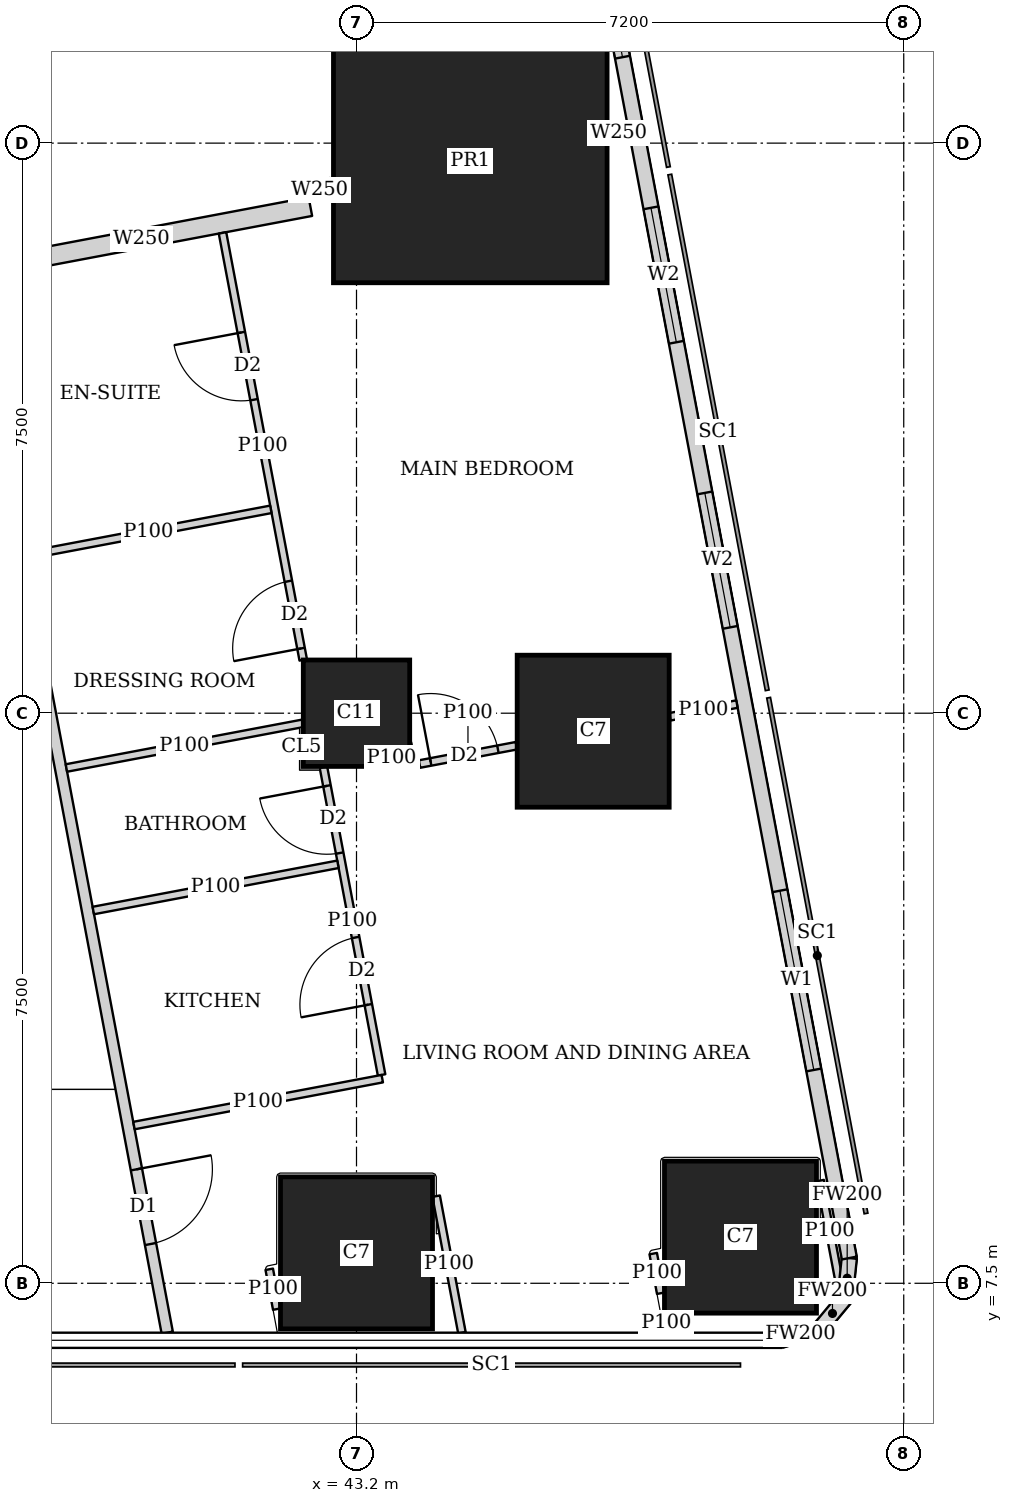
"""IFC4 building model, lengths in metres.
Left out: names, types, materials, properties, quantities, classifications, styles, units other than length and angle.
Written with IfcOpenShell. Run it as: python <this file> out.ifc"""

import sys

from ifc_helpers import new_model, si_unit, direction, frame, frame_2d, origin, origin_2d, place, context, subcontext, project, spatial, rectangle, extrude, element, fill, save


model = new_model("IFC4")
c1 = context("Model", 3, precision=1e-05, world=origin(), true_north=direction((0.0, 1.0)))
c2 = subcontext(c1, "Body", "Model", "MODEL_VIEW")
j1 = project(units=[si_unit("LENGTHUNIT", "METRE"), si_unit("PLANEANGLEUNIT", "RADIAN")], contexts=[c1])
p1 = place(None, origin())
s1 = spatial("IfcSite", under=j1, at=p1, CompositionType="ELEMENT")
p2 = place(p1, origin())
s2 = spatial("IfcBuilding", under=s1, at=p2, CompositionType="ELEMENT")
p3 = place(p2, frame((0.0, 0.0, 292.85)))
s3 = spatial("IfcBuildingStorey", under=s2, at=p3, CompositionType="ELEMENT", Elevation=292.85)
for number, where, z_axis, x_axis in (
    (1, (43.2, 7.9, 0.0), (0.0, 0.0, 1.0), (1.0, 0.0, 0.0)),
    (2, (48.252, 8.107, 0.0), (0.0, 0.0, 1.0), (1.0, 0.0, 0.0)),
):
    element("IfcColumn", number, at=place(p3, frame(where, z_axis=z_axis, x_axis=x_axis)), inside=s3, PredefinedType="COLUMN", context=c2, shape_type="SweptSolid", body=[
        extrude(rectangle(XDim=2.0, YDim=2.0, at=origin_2d()), origin(), (0.0, 0.0, 1.0), 3.75),
    ])
p4 = place(p3, frame((43.2, 15.0, 0.0), z_axis=(0.0, 0.0, 1.0), x_axis=(1.0, 0.0, 0.0)))
e3 = element("IfcColumn", 3, at=p4, inside=s3, PredefinedType="COLUMN", context=c2, shape_type="SweptSolid", body=[
    extrude(rectangle(XDim=1.4, YDim=1.4, at=origin_2d()), origin(), (0.0, 0.0, 1.0), 3.75),
])
p5 = place(p3, frame((46.314, 14.763, 0.0), z_axis=(0.0, 0.0, 1.0), x_axis=(1.0, 0.0, 0.0)))
e4 = element("IfcColumn", 4, at=p5, inside=s3, PredefinedType="COLUMN", context=c2, shape_type="SweptSolid", body=[
    extrude(rectangle(XDim=2.0, YDim=2.0, at=origin_2d()), origin(), (0.0, 0.0, 1.0), 3.75),
])
p6 = place(p3, frame((44.697, 22.263, 0.0), z_axis=(0.0, 0.0, 1.0), x_axis=(1.0, 0.0, 0.0)))
e5 = element("IfcColumn", 5, at=p6, inside=s3, PredefinedType="COLUMN", context=c2, shape_type="SweptSolid", body=[
    extrude(rectangle(XDim=3.6, YDim=3.2, at=origin_2d()), origin(), (0.0, 0.0, 1.0), 3.75),
])
p7 = place(p3, frame((48.787, 6.75, 0.0), z_axis=(0.0, 0.0, 1.0), x_axis=(0.957282247819, 0.289155145225, 0.0)))
e6 = element("IfcWall", 6, at=p7, inside=s3, PredefinedType="SOLIDWALL", context=c2, shape_type="SweptSolid", body=[
    extrude(rectangle(XDim=0.533, YDim=0.2, at=frame_2d((0.266, 0.0))), origin(), (0.0, 0.0, 1.0), 3.4),
])
p8 = place(p3, frame((49.297, 6.904, 0.0), z_axis=(0.0, 0.0, 1.0), x_axis=(0.639255849474, 0.768994121508, 0.0)))
e7 = element("IfcWall", 7, at=p8, inside=s3, PredefinedType="SOLIDWALL", context=c2, shape_type="SweptSolid", body=[
    extrude(rectangle(XDim=0.518, YDim=0.2, at=frame_2d((0.259, 0.0))), origin(), (0.0, 0.0, 1.0), 3.4),
])
p9 = place(p3, frame((49.628, 7.302, 0.0), z_axis=(0.0, 0.0, 1.0), x_axis=(0.105352390132, 0.994434952068, 0.0)))
e8 = element("IfcWall", 8, at=p9, inside=s3, PredefinedType="SOLIDWALL", context=c2, shape_type="SweptSolid", body=[
    extrude(rectangle(XDim=0.533, YDim=0.2, at=frame_2d((0.267, 0.0))), origin(), (0.0, 0.0, 1.0), 3.4),
])
p10 = place(p3, frame((49.684, 7.832, 0.0), z_axis=(0.0, 0.0, 1.0), x_axis=(-0.185616669694, 0.982622232565, 0.0)))
e9 = element("IfcWall", 9, at=p10, inside=s3, PredefinedType="SOLIDWALL", context=c2, shape_type="SweptSolid", body=[
    extrude(rectangle(XDim=36.0, YDim=0.2, at=frame_2d((18.0, 0.0))), origin(), (0.0, 0.0, 1.0), 3.4),
])
p11 = place(p10, frame((2.518, 0.0, 0.9)))
e10 = element("IfcOpeningElement", 10, at=p11, cuts=e9, PredefinedType="OPENING", context=c2, shape_type="SweptSolid", body=[
    extrude(rectangle(XDim=2.4, YDim=1.5, at=frame_2d((1.2, 0.75))), frame((0.0, 0.11, 0.0), z_axis=(0.0, -1.0, 0.0), x_axis=(1.0, 0.0, 0.0)), (0.0, 0.0, 1.0), 0.22),
])
p12 = place(p10, frame((8.444, 0.0, 0.9)))
e11 = element("IfcOpeningElement", 11, at=p12, cuts=e9, PredefinedType="OPENING", context=c2, shape_type="SweptSolid", body=[
    extrude(rectangle(XDim=1.8, YDim=1.5, at=frame_2d((0.9, 0.75))), frame((0.0, 0.11, 0.0), z_axis=(0.0, -1.0, 0.0), x_axis=(1.0, 0.0, 0.0)), (0.0, 0.0, 1.0), 0.22),
])
p13 = place(p10, frame((12.261, 0.0, 0.9)))
e12 = element("IfcOpeningElement", 12, at=p13, cuts=e9, PredefinedType="OPENING", context=c2, shape_type="SweptSolid", body=[
    extrude(rectangle(XDim=1.8, YDim=1.5, at=frame_2d((0.9, 0.75))), frame((0.0, 0.11, 0.0), z_axis=(0.0, -1.0, 0.0), x_axis=(1.0, 0.0, 0.0)), (0.0, 0.0, 1.0), 0.22),
])
p14 = place(p10, frame((16.078, 0.0, 0.9)))
e13 = element("IfcOpeningElement", 13, at=p14, cuts=e9, PredefinedType="OPENING", context=c2, shape_type="SweptSolid", body=[
    extrude(rectangle(XDim=1.8, YDim=1.5, at=frame_2d((0.9, 0.75))), frame((0.0, 0.11, 0.0), z_axis=(0.0, -1.0, 0.0), x_axis=(1.0, 0.0, 0.0)), (0.0, 0.0, 1.0), 0.22),
])
p15 = place(p10, frame((19.894, 0.0, 0.9)))
e14 = element("IfcOpeningElement", 14, at=p15, cuts=e9, PredefinedType="OPENING", context=c2, shape_type="SweptSolid", body=[
    extrude(rectangle(XDim=1.8, YDim=1.5, at=frame_2d((0.9, 0.75))), frame((0.0, 0.11, 0.0), z_axis=(0.0, -1.0, 0.0), x_axis=(1.0, 0.0, 0.0)), (0.0, 0.0, 1.0), 0.22),
])
p16 = place(p10, frame((23.71, 0.0, 0.9)))
e15 = element("IfcOpeningElement", 15, at=p16, cuts=e9, PredefinedType="OPENING", context=c2, shape_type="SweptSolid", body=[
    extrude(rectangle(XDim=1.8, YDim=1.5, at=frame_2d((0.9, 0.75))), frame((0.0, 0.11, 0.0), z_axis=(0.0, -1.0, 0.0), x_axis=(1.0, 0.0, 0.0)), (0.0, 0.0, 1.0), 0.22),
])
p17 = place(p10, frame((27.526, 0.0, 0.9)))
e16 = element("IfcOpeningElement", 16, at=p17, cuts=e9, PredefinedType="OPENING", context=c2, shape_type="SweptSolid", body=[
    extrude(rectangle(XDim=1.8, YDim=1.5, at=frame_2d((0.9, 0.75))), frame((0.0, 0.11, 0.0), z_axis=(0.0, -1.0, 0.0), x_axis=(1.0, 0.0, 0.0)), (0.0, 0.0, 1.0), 0.22),
])
p18 = place(p10, frame((32.046, 0.0, 0.9)))
e17 = element("IfcOpeningElement", 17, at=p18, cuts=e9, PredefinedType="OPENING", context=c2, shape_type="SweptSolid", body=[
    extrude(rectangle(XDim=1.8, YDim=1.5, at=frame_2d((0.9, 0.75))), frame((0.0, 0.11, 0.0), z_axis=(0.0, -1.0, 0.0), x_axis=(1.0, 0.0, 0.0)), (0.0, 0.0, 1.0), 0.22),
])
p19 = place(p3, frame((34.036, 42.186, 0.0), z_axis=(0.0, 0.0, 1.0), x_axis=(0.185593518645, -0.9826266055, 0.0)))
e18 = element("IfcWall", 18, at=p19, inside=s3, PredefinedType="SOLIDWALL", context=c2, shape_type="SweptSolid", body=[
    extrude(rectangle(XDim=35.961, YDim=0.15, at=frame_2d((17.98, 0.0))), origin(), (0.0, 0.0, 1.0), 2.4),
])
p20 = place(p19, frame((19.345, 0.0, 0.0)))
e19 = element("IfcOpeningElement", 19, at=p20, cuts=e18, PredefinedType="OPENING", context=c2, shape_type="SweptSolid", body=[
    extrude(rectangle(XDim=1.0, YDim=2.1, at=frame_2d((0.5, 1.05))), frame((0.0, 0.085, 0.0), z_axis=(0.0, -1.0, 0.0), x_axis=(1.0, 0.0, 0.0)), (0.0, 0.0, 1.0), 0.17),
])
p21 = place(p19, frame((33.774, 0.0, 0.0)))
e20 = element("IfcOpeningElement", 20, at=p21, cuts=e18, PredefinedType="OPENING", context=c2, shape_type="SweptSolid", body=[
    extrude(rectangle(XDim=1.0, YDim=2.1, at=frame_2d((0.5, 1.05))), frame((0.0, 0.085, 0.0), z_axis=(0.0, -1.0, 0.0), x_axis=(1.0, 0.0, 0.0)), (0.0, 0.0, 1.0), 0.17),
])
p22 = place(p3, frame((44.248, 8.646, 0.0), z_axis=(0.0, 0.0, 1.0), x_axis=(0.185417594585, -0.982659816833, 0.0)))
e21 = element("IfcWall", 21, at=p22, inside=s3, PredefinedType="PARTITIONING", context=c2, shape_type="SweptSolid", body=[
    extrude(rectangle(XDim=1.828, YDim=0.1, at=frame_2d((0.914, 0.0))), origin(), (0.0, 0.0, 1.0), 1.95),
])
p23 = place(p3, frame((42.151, 7.16, 0.0), z_axis=(0.0, 0.0, 1.0), x_axis=(-0.185366164644, 0.982669519729, 0.0)))
e22 = element("IfcWall", 22, at=p23, inside=s3, PredefinedType="PARTITIONING", context=c2, shape_type="SweptSolid", body=[
    extrude(rectangle(XDim=0.533, YDim=0.1, at=frame_2d((0.267, 0.0))), origin(), (0.0, 0.0, 1.0), 2.4),
])
p24 = place(p3, frame((49.3, 8.851, 0.0), z_axis=(0.0, 0.0, 1.0), x_axis=(0.18581620423, -0.982584519645, 0.0)))
e23 = element("IfcWall", 23, at=p24, inside=s3, PredefinedType="PARTITIONING", context=c2, shape_type="SweptSolid", body=[
    extrude(rectangle(XDim=1.351, YDim=0.1, at=frame_2d((0.675, 0.0))), origin(), (0.0, 0.0, 1.0), 3.4),
])
p25 = place(p3, frame((47.301, 6.85, 0.0), z_axis=(0.0, 0.0, 1.0), x_axis=(-0.187513903188, 0.982261948826, 0.0)))
e24 = element("IfcWall", 24, at=p25, inside=s3, PredefinedType="PARTITIONING", context=c2, shape_type="SweptSolid", body=[
    extrude(rectangle(XDim=0.251, YDim=0.1, at=frame_2d((0.125, 0.0))), origin(), (0.0, 0.0, 1.0), 3.4),
])
p26 = place(p3, frame((47.203, 7.369, 0.0), z_axis=(0.0, 0.0, 1.0), x_axis=(-0.186456243114, 0.982463266185, 0.0)))
e25 = element("IfcWall", 25, at=p26, inside=s3, PredefinedType="PARTITIONING", context=c2, shape_type="SweptSolid", body=[
    extrude(rectangle(XDim=0.53, YDim=0.1, at=frame_2d((0.265, 0.0))), origin(), (0.0, 0.0, 1.0), 1.95),
])
p27 = place(p3, frame((46.782, 22.657, 0.0), z_axis=(0.0, 0.0, 1.0), x_axis=(-0.982104607121, -0.188336243648, 0.0)))
e26 = element("IfcWall", 26, at=p27, inside=s3, PredefinedType="SOLIDWALL", context=c2, shape_type="SweptSolid", body=[
    extrude(rectangle(XDim=0.266, YDim=0.25, at=frame_2d((0.133, 0.0))), origin(), (0.0, 0.0, 1.0), 3.4),
])
p28 = place(p3, frame((42.873, 21.918, 0.0), z_axis=(0.0, 0.0, 1.0), x_axis=(-0.982431406936, -0.186624035603, 0.0)))
e27 = element("IfcWall", 27, at=p28, inside=s3, PredefinedType="SOLIDWALL", context=c2, shape_type="SweptSolid", body=[
    extrude(rectangle(XDim=0.322, YDim=0.25, at=frame_2d((0.161, 0.0))), origin(), (0.0, 0.0, 1.0), 2.4),
])
p29 = place(p3, frame((42.593, 21.665, 0.0), z_axis=(0.0, 0.0, 1.0), x_axis=(-0.982612837616, -0.185666398014, 0.0)))
e28 = element("IfcWall", 28, at=p29, inside=s3, PredefinedType="SOLIDWALL", context=c2, shape_type="SweptSolid", body=[
    extrude(rectangle(XDim=4.525, YDim=0.25, at=frame_2d((2.262, 0.0))), origin(), (0.0, 0.0, 1.0), 2.4),
])
p30 = place(p3, frame((48.206, 15.12, 0.0), z_axis=(0.0, 0.0, 1.0), x_axis=(-0.982497680814, -0.186274816318, 0.0)))
e29 = element("IfcWall", 29, at=p30, inside=s3, PredefinedType="PARTITIONING", context=c2, shape_type="SweptSolid", body=[
    extrude(rectangle(XDim=0.898, YDim=0.1, at=frame_2d((0.449, 0.0))), origin(), (0.0, 0.0, 1.0), 3.4),
])
p31 = place(p3, frame((45.304, 14.572, 0.0), z_axis=(0.0, 0.0, 1.0), x_axis=(-0.982602741717, -0.185719821156, 0.0)))
e30 = element("IfcWall", 30, at=p31, inside=s3, PredefinedType="PARTITIONING", context=c2, shape_type="SweptSolid", body=[
    extrude(rectangle(XDim=1.297, YDim=0.1, at=frame_2d((0.649, 0.0))), origin(), (0.0, 0.0, 1.0), 3.4),
])
p32 = place(p31, frame((0.248, 0.0, 0.0)))
e31 = element("IfcOpeningElement", 31, at=p32, cuts=e30, PredefinedType="OPENING", context=c2, shape_type="SweptSolid", body=[
    extrude(rectangle(XDim=0.9, YDim=2.1, at=frame_2d((0.45, 1.05))), frame((0.0, 0.06, 0.0), z_axis=(0.0, -1.0, 0.0), x_axis=(1.0, 0.0, 0.0)), (0.0, 0.0, 1.0), 0.12),
])
p33 = place(p3, frame((43.949, 14.485, 0.0), z_axis=(0.0, 0.0, 1.0), x_axis=(0.188651210932, -0.982044154106, 0.0)))
e32 = element("IfcWall", 32, at=p33, inside=s3, PredefinedType="PARTITIONING", context=c2, shape_type="SweptSolid", body=[
    extrude(rectangle(XDim=0.138, YDim=0.1, at=frame_2d((0.069, 0.0))), origin(), (0.0, 0.0, 1.0), 3.4),
])
p34 = place(p3, frame((42.073, 17.682, 0.0), z_axis=(0.0, 0.0, 1.0), x_axis=(-0.982620626894, -0.185625169636, 0.0)))
e33 = element("IfcWall", 33, at=p34, inside=s3, PredefinedType="PARTITIONING", context=c2, shape_type="SweptSolid", body=[
    extrude(rectangle(XDim=3.275, YDim=0.1, at=frame_2d((1.637, 0.0))), origin(), (0.0, 0.0, 1.0), 2.5),
])
p35 = place(p3, frame((42.49, 14.866, 0.0), z_axis=(0.0, 0.0, 1.0), x_axis=(-0.982621285075, -0.185621685472, 0.0)))
e34 = element("IfcWall", 34, at=p35, inside=s3, PredefinedType="PARTITIONING", context=c2, shape_type="SweptSolid", body=[
    extrude(rectangle(XDim=3.162, YDim=0.1, at=frame_2d((1.581, 0.0))), origin(), (0.0, 0.0, 1.0), 2.5),
])
p36 = place(p3, frame((42.956, 13.012, 0.0), z_axis=(0.0, 0.0, 1.0), x_axis=(-0.982630897129, -0.185570795135, 0.0)))
e35 = element("IfcWall", 35, at=p36, inside=s3, PredefinedType="PARTITIONING", context=c2, shape_type="SweptSolid", body=[
    extrude(rectangle(XDim=3.276, YDim=0.1, at=frame_2d((1.638, 0.0))), origin(), (0.0, 0.0, 1.0), 2.5),
])
p37 = place(p3, frame((43.539, 10.192, 0.0), z_axis=(0.0, 0.0, 1.0), x_axis=(-0.982633623707, -0.185556356831, 0.0)))
e36 = element("IfcWall", 36, at=p37, inside=s3, PredefinedType="PARTITIONING", context=c2, shape_type="SweptSolid", body=[
    extrude(rectangle(XDim=3.325, YDim=0.1, at=frame_2d((1.663, 0.0))), origin(), (0.0, 0.0, 1.0), 2.5),
])
p38 = place(p3, frame((41.437, 21.319, 0.0), z_axis=(0.0, 0.0, 1.0), x_axis=(0.185742368638, -0.982598479794, 0.0)))
e37 = element("IfcWall", 37, at=p38, inside=s3, PredefinedType="PARTITIONING", context=c2, shape_type="SweptSolid", body=[
    extrude(rectangle(XDim=5.718, YDim=0.1, at=frame_2d((2.859, 0.0))), origin(), (0.0, 0.0, 1.0), 3.4),
])
p39 = place(p38, frame((1.333, 0.0, 0.0)))
e38 = element("IfcOpeningElement", 38, at=p39, cuts=e37, PredefinedType="OPENING", context=c2, shape_type="SweptSolid", body=[
    extrude(rectangle(XDim=0.9, YDim=2.1, at=frame_2d((0.45, 1.05))), frame((0.0, 0.06, 0.0), z_axis=(0.0, -1.0, 0.0), x_axis=(1.0, 0.0, 0.0)), (0.0, 0.0, 1.0), 0.12),
])
p40 = place(p38, frame((4.664, 0.0, 0.0)))
e39 = element("IfcOpeningElement", 39, at=p40, cuts=e37, PredefinedType="OPENING", context=c2, shape_type="SweptSolid", body=[
    extrude(rectangle(XDim=0.9, YDim=2.1, at=frame_2d((0.45, 1.05))), frame((0.0, 0.06, 0.0), z_axis=(0.0, -1.0, 0.0), x_axis=(1.0, 0.0, 0.0)), (0.0, 0.0, 1.0), 0.12),
])
p41 = place(p3, frame((42.765, 14.29, 0.0), z_axis=(0.0, 0.0, 1.0), x_axis=(0.185679870644, -0.982610291844, 0.0)))
e40 = element("IfcWall", 40, at=p41, inside=s3, PredefinedType="PARTITIONING", context=c2, shape_type="SweptSolid", body=[
    extrude(rectangle(XDim=4.121, YDim=0.1, at=frame_2d((2.061, 0.0))), origin(), (0.0, 0.0, 1.0), 2.5),
])
p42 = place(p41, frame((0.25, 0.0, 0.0)))
e41 = element("IfcOpeningElement", 41, at=p42, cuts=e40, PredefinedType="OPENING", context=c2, shape_type="SweptSolid", body=[
    extrude(rectangle(XDim=0.9, YDim=2.1, at=frame_2d((0.45, 1.05))), frame((0.0, 0.06, 0.0), z_axis=(0.0, -1.0, 0.0), x_axis=(1.0, 0.0, 0.0)), (0.0, 0.0, 1.0), 0.12),
])
p43 = place(p41, frame((2.28, 0.0, 0.0)))
e42 = element("IfcOpeningElement", 42, at=p43, cuts=e40, PredefinedType="OPENING", context=c2, shape_type="SweptSolid", body=[
    extrude(rectangle(XDim=0.9, YDim=2.1, at=frame_2d((0.45, 1.05))), frame((0.0, 0.06, 0.0), z_axis=(0.0, -1.0, 0.0), x_axis=(1.0, 0.0, 0.0)), (0.0, 0.0, 1.0), 0.12),
])
p44 = place(p11, origin())
e43 = element("IfcWindow", 43, at=p44, inside=s3, PartitioningType="SINGLE_PANEL", PredefinedType="WINDOW", context=c2, shape_type="SweptSolid", body=[
    extrude(rectangle(XDim=2.4, YDim=1.5, at=frame_2d((1.2, 0.75))), frame((0.0, 0.03, 0.0), z_axis=(0.0, -1.0, 0.0), x_axis=(1.0, 0.0, 0.0)), (0.0, 0.0, 1.0), 0.06),
])
fill(e10, e43)
p45 = place(p12, origin())
e44 = element("IfcWindow", 44, at=p45, inside=s3, PartitioningType="SINGLE_PANEL", PredefinedType="WINDOW", context=c2, shape_type="SweptSolid", body=[
    extrude(rectangle(XDim=1.8, YDim=1.5, at=frame_2d((0.9, 0.75))), frame((0.0, 0.03, 0.0), z_axis=(0.0, -1.0, 0.0), x_axis=(1.0, 0.0, 0.0)), (0.0, 0.0, 1.0), 0.06),
])
fill(e11, e44)
p46 = place(p13, origin())
e45 = element("IfcWindow", 45, at=p46, inside=s3, PartitioningType="SINGLE_PANEL", PredefinedType="WINDOW", context=c2, shape_type="SweptSolid", body=[
    extrude(rectangle(XDim=1.8, YDim=1.5, at=frame_2d((0.9, 0.75))), frame((0.0, 0.03, 0.0), z_axis=(0.0, -1.0, 0.0), x_axis=(1.0, 0.0, 0.0)), (0.0, 0.0, 1.0), 0.06),
])
fill(e12, e45)
p47 = place(p14, origin())
e46 = element("IfcWindow", 46, at=p47, inside=s3, PartitioningType="SINGLE_PANEL", PredefinedType="WINDOW", context=c2, shape_type="SweptSolid", body=[
    extrude(rectangle(XDim=1.8, YDim=1.5, at=frame_2d((0.9, 0.75))), frame((0.0, 0.03, 0.0), z_axis=(0.0, -1.0, 0.0), x_axis=(1.0, 0.0, 0.0)), (0.0, 0.0, 1.0), 0.06),
])
fill(e13, e46)
p48 = place(p32, origin())
e47 = element("IfcDoor", 47, at=p48, inside=s3, OperationType="SINGLE_SWING_LEFT", PredefinedType="DOOR", context=c2, shape_type="SweptSolid", body=[
    extrude(rectangle(XDim=0.9, YDim=2.1, at=frame_2d((0.45, 1.05))), frame((0.0, 0.025, 0.0), z_axis=(0.0, -1.0, 0.0), x_axis=(1.0, 0.0, 0.0)), (0.0, 0.0, 1.0), 0.05),
])
fill(e31, e47)
p49 = place(p39, origin())
e48 = element("IfcDoor", 48, at=p49, inside=s3, OperationType="SINGLE_SWING_RIGHT", PredefinedType="DOOR", context=c2, shape_type="SweptSolid", body=[
    extrude(rectangle(XDim=0.9, YDim=2.1, at=frame_2d((0.45, 1.05))), frame((0.0, 0.025, 0.0), z_axis=(0.0, -1.0, 0.0), x_axis=(1.0, 0.0, 0.0)), (0.0, 0.0, 1.0), 0.05),
])
fill(e38, e48)
p50 = place(p40, origin())
e49 = element("IfcDoor", 49, at=p50, inside=s3, OperationType="SINGLE_SWING_LEFT", PredefinedType="DOOR", context=c2, shape_type="SweptSolid", body=[
    extrude(rectangle(XDim=0.9, YDim=2.1, at=frame_2d((0.45, 1.05))), frame((0.0, 0.025, 0.0), z_axis=(0.0, -1.0, 0.0), x_axis=(1.0, 0.0, 0.0)), (0.0, 0.0, 1.0), 0.05),
])
fill(e39, e49)
p51 = place(p42, origin())
e50 = element("IfcDoor", 50, at=p51, inside=s3, OperationType="SINGLE_SWING_RIGHT", PredefinedType="DOOR", context=c2, shape_type="SweptSolid", body=[
    extrude(rectangle(XDim=0.9, YDim=2.1, at=frame_2d((0.45, 1.05))), frame((0.0, 0.025, 0.0), z_axis=(0.0, -1.0, 0.0), x_axis=(1.0, 0.0, 0.0)), (0.0, 0.0, 1.0), 0.05),
])
fill(e41, e50)
p52 = place(p43, origin())
e51 = element("IfcDoor", 51, at=p52, inside=s3, OperationType="SINGLE_SWING_LEFT", PredefinedType="DOOR", context=c2, shape_type="SweptSolid", body=[
    extrude(rectangle(XDim=0.9, YDim=2.1, at=frame_2d((0.45, 1.05))), frame((0.0, 0.025, 0.0), z_axis=(0.0, -1.0, 0.0), x_axis=(1.0, 0.0, 0.0)), (0.0, 0.0, 1.0), 0.05),
])
fill(e42, e51)
p53 = place(p21, origin())
e52 = element("IfcDoor", 52, at=p53, inside=s3, OperationType="SINGLE_SWING_LEFT", PredefinedType="DOOR", context=c2, shape_type="SweptSolid", body=[
    extrude(rectangle(XDim=1.0, YDim=2.1, at=frame_2d((0.5, 1.05))), frame((0.0, 0.025, 0.0), z_axis=(0.0, -1.0, 0.0), x_axis=(1.0, 0.0, 0.0)), (0.0, 0.0, 1.0), 0.05),
])
fill(e20, e52)
save(model, sys.argv[1])
